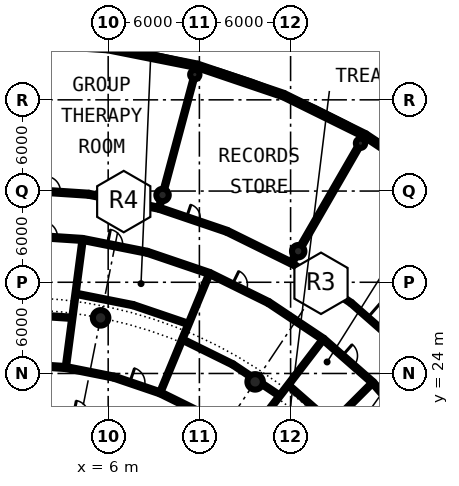
"""IFC4 building model, lengths in metres.
Left out: names, types, materials, properties, quantities, classifications, styles, units other than length and angle.
Written with IfcOpenShell. Run it as: python <this file> out.ifc"""

import sys

from ifc_helpers import new_model, si_unit, direction, frame, frame_2d, origin, origin_2d, place, context, subcontext, project, spatial, rectangle, hollow_circle, extrude, element, fill, save


model = new_model("IFC4")
c1 = context("Model", 3, precision=1e-05, world=origin(), true_north=direction((0.0, 1.0)))
c2 = subcontext(c1, "Body", "Model", "MODEL_VIEW")
j1 = project(units=[si_unit("LENGTHUNIT", "METRE"), si_unit("PLANEANGLEUNIT", "RADIAN")], contexts=[c1])
p1 = place(None, origin())
s1 = spatial("IfcSite", under=j1, at=p1, CompositionType="ELEMENT")
p2 = place(p1, origin())
s2 = spatial("IfcBuilding", under=s1, at=p2, CompositionType="ELEMENT")
p3 = place(p2, frame((0.0, 0.0, 5.4)))
s3 = spatial("IfcBuildingStorey", under=s2, at=p3, CompositionType="ELEMENT", Elevation=5.4)
for number, where, z_axis, x_axis in (
    (1, (15.667, 23.448, 0.0), (0.0, 0.0, 1.0), (1.0, 0.0, 0.0)),
    (2, (5.501, 27.658, 0.0), (0.0, 0.0, 1.0), (1.0, 0.0, 0.0)),
):
    element("IfcColumn", number, at=place(p3, frame(where, z_axis=z_axis, x_axis=x_axis)), inside=s3, PredefinedType="COLUMN", context=c2, shape_type="SweptSolid", body=[
        extrude(hollow_circle(Radius=0.508, WallThickness=0.05, at=origin_2d()), origin(), (0.0, 0.0, 1.0), 4.2),
    ])
for number, where, z_axis, x_axis in (
    (3, (18.5, 32.043, 0.0), (0.0, 0.0, 1.0), (1.0, 0.0, 0.0)),
    (4, (9.576, 35.739, 0.0), (0.0, 0.0, 1.0), (1.0, 0.0, 0.0)),
):
    element("IfcColumn", number, at=place(p3, frame(where, z_axis=z_axis, x_axis=x_axis)), inside=s3, PredefinedType="COLUMN", context=c2, shape_type="SweptSolid", body=[
        extrude(hollow_circle(Radius=0.406, WallThickness=0.03, at=origin_2d()), origin(), (0.0, 0.0, 1.0), 4.2),
    ])
for number, where, z_axis, x_axis in (
    (5, (22.6, 39.144, 0.0), (0.0, 0.0, 1.0), (1.0, 0.0, 0.0)),
    (6, (11.698, 43.66, 0.0), (0.0, 0.0, 1.0), (1.0, 0.0, 0.0)),
):
    element("IfcColumn", number, at=place(p3, frame(where, z_axis=z_axis, x_axis=x_axis)), inside=s3, PredefinedType="COLUMN", context=c2, shape_type="SweptSolid", body=[
        extrude(hollow_circle(Radius=0.305, WallThickness=0.025, at=origin_2d()), origin(), (0.0, 0.0, 1.0), 4.2),
    ])
p4 = place(p3, frame((27.881, 36.336, 0.0), z_axis=(0.0, 0.0, 1.0), x_axis=(-0.831485590074, 0.55554631985, 0.0)))
e7 = element("IfcWall", 7, at=p4, inside=s3, PredefinedType="SOLIDWALL", context=c2, shape_type="SweptSolid", body=[
    extrude(rectangle(XDim=5.991, YDim=0.3, at=frame_2d((2.995, 0.0))), origin(), (0.0, 0.0, 1.0), 3.7),
])
p5 = place(p4, frame((1.495, 0.0, 1.0)))
e8 = element("IfcOpeningElement", 8, at=p5, cuts=e7, PredefinedType="OPENING", context=c2, shape_type="SweptSolid", body=[
    extrude(rectangle(XDim=3.0, YDim=2.0, at=frame_2d((1.5, 1.0))), frame((0.0, 0.16, 0.0), z_axis=(0.0, -1.0, 0.0), x_axis=(1.0, 0.0, 0.0)), (0.0, 0.0, 1.0), 0.32),
])
p6 = place(p3, frame((22.9, 39.664, 0.0), z_axis=(0.0, 0.0, 1.0), x_axis=(-0.896850939151, 0.44233289833, 0.0)))
e9 = element("IfcWall", 9, at=p6, inside=s3, PredefinedType="SOLIDWALL", context=c2, shape_type="SweptSolid", body=[
    extrude(rectangle(XDim=5.991, YDim=0.3, at=frame_2d((2.995, 0.0))), origin(), (0.0, 0.0, 1.0), 3.7),
])
p7 = place(p6, frame((1.495, 0.0, 1.0)))
e10 = element("IfcOpeningElement", 10, at=p7, cuts=e9, PredefinedType="OPENING", context=c2, shape_type="SweptSolid", body=[
    extrude(rectangle(XDim=3.0, YDim=2.0, at=frame_2d((1.5, 1.0))), frame((0.0, 0.16, 0.0), z_axis=(0.0, -1.0, 0.0), x_axis=(1.0, 0.0, 0.0)), (0.0, 0.0, 1.0), 0.32),
])
p8 = place(p3, frame((17.527, 42.314, 0.0), z_axis=(0.0, 0.0, 1.0), x_axis=(-0.946966078776, 0.321333542675, 0.0)))
e11 = element("IfcWall", 11, at=p8, inside=s3, PredefinedType="SOLIDWALL", context=c2, shape_type="SweptSolid", body=[
    extrude(rectangle(XDim=5.991, YDim=0.3, at=frame_2d((2.995, 0.0))), origin(), (0.0, 0.0, 1.0), 3.7),
])
p9 = place(p8, frame((1.495, 0.0, 1.0)))
e12 = element("IfcOpeningElement", 12, at=p9, cuts=e11, PredefinedType="OPENING", context=c2, shape_type="SweptSolid", body=[
    extrude(rectangle(XDim=3.0, YDim=2.0, at=frame_2d((1.5, 1.0))), frame((0.0, 0.16, 0.0), z_axis=(0.0, -1.0, 0.0), x_axis=(1.0, 0.0, 0.0)), (0.0, 0.0, 1.0), 0.32),
])
p10 = place(p3, frame((11.854, 44.239, 0.0), z_axis=(0.0, 0.0, 1.0), x_axis=(-0.980780780021, 0.195112945602, 0.0)))
e13 = element("IfcWall", 13, at=p10, inside=s3, PredefinedType="SOLIDWALL", context=c2, shape_type="SweptSolid", body=[
    extrude(rectangle(XDim=5.991, YDim=0.3, at=frame_2d((2.996, 0.0))), origin(), (0.0, 0.0, 1.0), 3.7),
])
p11 = place(p10, frame((1.495, 0.0, 1.0)))
e14 = element("IfcOpeningElement", 14, at=p11, cuts=e13, PredefinedType="OPENING", context=c2, shape_type="SweptSolid", body=[
    extrude(rectangle(XDim=3.0, YDim=2.0, at=frame_2d((1.5, 1.0))), frame((0.0, 0.16, 0.0), z_axis=(0.0, -1.0, 0.0), x_axis=(1.0, 0.0, 0.0)), (0.0, 0.0, 1.0), 0.32),
])
p12 = place(p3, frame((3.213, 24.39, 0.0), z_axis=(0.0, 0.0, 1.0), x_axis=(0.130265034912, 0.991479208395, 0.0)))
e15 = element("IfcWall", 15, at=p12, inside=s3, PredefinedType="PARTITIONING", context=c2, shape_type="SweptSolid", body=[
    extrude(rectangle(XDim=8.5, YDim=0.15, at=frame_2d((4.25, 0.0))), origin(), (0.0, 0.0, 1.0), 3.7),
])
p13 = place(p3, frame((9.341, 34.87, 0.0), z_axis=(0.0, 0.0, 1.0), x_axis=(0.259239435518, 0.965813084956, 0.0)))
e16 = element("IfcWall", 16, at=p13, inside=s3, PredefinedType="PARTITIONING", context=c2, shape_type="SweptSolid", body=[
    extrude(rectangle(XDim=0.501, YDim=0.15, at=frame_2d((0.25, 0.0))), origin(), (0.0, 0.0, 1.0), 3.7),
])
p14 = place(p3, frame((9.414, 22.727, 0.0), z_axis=(0.0, 0.0, 1.0), x_axis=(0.38259533032, 0.923916020652, 0.0)))
e17 = element("IfcWall", 17, at=p14, inside=s3, PredefinedType="PARTITIONING", context=c2, shape_type="SweptSolid", body=[
    extrude(rectangle(XDim=8.5, YDim=0.15, at=frame_2d((4.25, 0.0))), origin(), (0.0, 0.0, 1.0), 3.7),
])
p15 = place(p3, frame((9.678, 36.126, 0.0), z_axis=(0.0, 0.0, 1.0), x_axis=(0.258647138934, 0.965971872013, 0.0)))
e18 = element("IfcWall", 18, at=p15, inside=s3, PredefinedType="PARTITIONING", context=c2, shape_type="SweptSolid", body=[
    extrude(rectangle(XDim=7.5, YDim=0.15, at=frame_2d((3.75, 0.0))), origin(), (0.0, 0.0, 1.0), 3.7),
])
p16 = place(p3, frame((14.976, 19.516, 0.0), z_axis=(0.0, 0.0, 1.0), x_axis=(0.608691402198, 0.793407068843, 0.0)))
e19 = element("IfcWall", 19, at=p16, inside=s3, PredefinedType="PARTITIONING", context=c2, shape_type="SweptSolid", body=[
    extrude(rectangle(XDim=8.5, YDim=0.15, at=frame_2d((4.25, 0.0))), origin(), (0.0, 0.0, 1.0), 3.7),
])
p17 = place(p3, frame((17.395, 17.395, 0.0), z_axis=(0.0, 0.0, 1.0), x_axis=(0.707106781187, 0.707106781187, 0.0)))
e20 = element("IfcWall", 20, at=p17, inside=s3, PredefinedType="PARTITIONING", context=c2, shape_type="SweptSolid", body=[
    extrude(rectangle(XDim=8.5, YDim=0.15, at=frame_2d((4.25, 0.0))), origin(), (0.0, 0.0, 1.0), 3.7),
])
p18 = place(p3, frame((18.052, 31.263, 0.0), z_axis=(0.0, 0.0, 1.0), x_axis=(0.499919672301, 0.866071776036, 0.0)))
e21 = element("IfcWall", 21, at=p18, inside=s3, PredefinedType="PARTITIONING", context=c2, shape_type="SweptSolid", body=[
    extrude(rectangle(XDim=0.5, YDim=0.2, at=frame_2d((0.25, 0.0))), origin(), (0.0, 0.0, 1.0), 3.7),
])
p19 = place(p3, frame((18.701, 32.388, 0.0), z_axis=(0.0, 0.0, 1.0), x_axis=(0.500101881357, 0.865966574565, 0.0)))
e22 = element("IfcWall", 22, at=p19, inside=s3, PredefinedType="PARTITIONING", context=c2, shape_type="SweptSolid", body=[
    extrude(rectangle(XDim=7.5, YDim=0.2, at=frame_2d((3.75, 0.0))), origin(), (0.0, 0.0, 1.0), 3.7),
])
p20 = place(p3, frame((0.0, 24.6, 0.0), z_axis=(0.0, 0.0, 1.0), x_axis=(0.997864008616, -0.06532549509, 0.0)))
e23 = element("IfcWall", 23, at=p20, inside=s3, PredefinedType="PARTITIONING", context=c2, shape_type="SweptSolid", body=[
    extrude(rectangle(XDim=3.218, YDim=0.2, at=frame_2d((1.609, 0.0))), origin(), (0.0, 0.0, 1.0), 3.7),
])
p21 = place(p20, frame((1.109, 0.0, 0.0)))
e24 = element("IfcOpeningElement", 24, at=p21, cuts=e23, PredefinedType="OPENING", context=c2, shape_type="SweptSolid", body=[
    extrude(rectangle(XDim=1.0, YDim=2.3, at=frame_2d((0.5, 1.15))), frame((0.0, 0.11, 0.0), z_axis=(0.0, -1.0, 0.0), x_axis=(1.0, 0.0, 0.0)), (0.0, 0.0, 1.0), 0.22),
])
p22 = place(p3, frame((3.211, 24.39, 0.0), z_axis=(0.0, 0.0, 1.0), x_axis=(0.98077570041, -0.195138477717, 0.0)))
e25 = element("IfcWall", 25, at=p22, inside=s3, PredefinedType="PARTITIONING", context=c2, shape_type="SweptSolid", body=[
    extrude(rectangle(XDim=3.218, YDim=0.2, at=frame_2d((1.609, 0.0))), origin(), (0.0, 0.0, 1.0), 3.7),
])
p23 = place(p3, frame((6.367, 23.762, 0.0), z_axis=(0.0, 0.0, 1.0), x_axis=(0.946877665823, -0.321593976879, 0.0)))
e26 = element("IfcWall", 26, at=p23, inside=s3, PredefinedType="PARTITIONING", context=c2, shape_type="SweptSolid", body=[
    extrude(rectangle(XDim=3.218, YDim=0.2, at=frame_2d((1.609, 0.0))), origin(), (0.0, 0.0, 1.0), 3.7),
])
p24 = place(p23, frame((1.109, 0.0, 0.0)))
e27 = element("IfcOpeningElement", 27, at=p24, cuts=e26, PredefinedType="OPENING", context=c2, shape_type="SweptSolid", body=[
    extrude(rectangle(XDim=1.0, YDim=2.3, at=frame_2d((0.5, 1.15))), frame((0.0, 0.11, 0.0), z_axis=(0.0, -1.0, 0.0), x_axis=(1.0, 0.0, 0.0)), (0.0, 0.0, 1.0), 0.22),
])
p25 = place(p3, frame((9.414, 22.727, 0.0), z_axis=(0.0, 0.0, 1.0), x_axis=(0.896886949195, -0.442259878763, 0.0)))
e28 = element("IfcWall", 28, at=p25, inside=s3, PredefinedType="PARTITIONING", context=c2, shape_type="SweptSolid", body=[
    extrude(rectangle(XDim=3.218, YDim=0.2, at=frame_2d((1.609, 0.0))), origin(), (0.0, 0.0, 1.0), 3.7),
])
p26 = place(p3, frame((0.0, 27.9, 0.0), z_axis=(0.0, 0.0, 1.0), x_axis=(0.997853582685, -0.065484559421, 0.0)))
e29 = element("IfcWall", 29, at=p26, inside=s3, PredefinedType="PARTITIONING", context=c2, shape_type="SweptSolid", body=[
    extrude(rectangle(XDim=3.65, YDim=0.15, at=frame_2d((1.825, 0.0))), origin(), (0.0, 0.0, 1.0), 3.7),
])
p27 = place(p3, frame((10.868, 26.238, 0.0), z_axis=(0.0, 0.0, 1.0), x_axis=(0.896884439776, -0.442264967738, 0.0)))
e30 = element("IfcWall", 30, at=p27, inside=s3, PredefinedType="PARTITIONING", context=c2, shape_type="SweptSolid", body=[
    extrude(rectangle(XDim=3.715, YDim=0.15, at=frame_2d((1.857, 0.0))), origin(), (0.0, 0.0, 1.0), 3.7),
])
for number, where, z_axis, x_axis in (
    (31, (14.2, 24.595, 0.0), (0.0, 0.0, 1.0), (0.832, -0.555, 0.0)),
    (32, (16.145, 23.295, 0.0), (0.0, 0.0, 1.0), (0.832, -0.555, 0.0)),
):
    element("IfcWall", number, at=place(p3, frame(where, z_axis=z_axis, x_axis=x_axis)), inside=s3, PredefinedType="PARTITIONING", context=c2, shape_type="SweptSolid", body=[
        extrude(rectangle(XDim=1.376, YDim=0.15, at=frame_2d((0.688, 0.0))), origin(), (0.0, 0.0, 1.0), 3.7),
    ])
p28 = place(p3, frame((17.837, 23.245, 0.0), z_axis=(0.0, 0.0, 1.0), x_axis=(0.751782936662, -0.659410658197, 0.0)))
e33 = element("IfcWall", 33, at=p28, inside=s3, PredefinedType="PARTITIONING", context=c2, shape_type="SweptSolid", body=[
    extrude(rectangle(XDim=3.832, YDim=0.15, at=frame_2d((1.916, 0.0))), origin(), (0.0, 0.0, 1.0), 3.7),
])
p29 = place(p3, frame((3.851, 29.248, 0.0), z_axis=(0.0, 0.0, 1.0), x_axis=(0.980772477442, -0.195154675813, 0.0)))
e34 = element("IfcWall", 34, at=p29, inside=s3, PredefinedType="PARTITIONING", context=c2, shape_type="SweptSolid", body=[
    extrude(rectangle(XDim=3.858, YDim=0.15, at=frame_2d((1.929, 0.0))), origin(), (0.0, 0.0, 1.0), 3.7),
])
p30 = place(p3, frame((7.635, 28.495, 0.0), z_axis=(0.0, 0.0, 1.0), x_axis=(0.946864867945, -0.321631655551, 0.0)))
e35 = element("IfcWall", 35, at=p30, inside=s3, PredefinedType="PARTITIONING", context=c2, shape_type="SweptSolid", body=[
    extrude(rectangle(XDim=3.859, YDim=0.15, at=frame_2d((1.93, 0.0))), origin(), (0.0, 0.0, 1.0), 3.7),
])
p31 = place(p3, frame((0.0, 33.1, 0.0), z_axis=(0.0, 0.0, 1.0), x_axis=(0.997858156097, -0.065414832499, 0.0)))
e36 = element("IfcWall", 36, at=p31, inside=s3, PredefinedType="PARTITIONING", context=c2, shape_type="SweptSolid", body=[
    extrude(rectangle(XDim=4.329, YDim=0.2, at=frame_2d((2.165, 0.0))), origin(), (0.0, 0.0, 1.0), 3.7),
])
p32 = place(p31, frame((1.665, 0.0, 0.0)))
e37 = element("IfcOpeningElement", 37, at=p32, cuts=e36, PredefinedType="OPENING", context=c2, shape_type="SweptSolid", body=[
    extrude(rectangle(XDim=1.0, YDim=2.3, at=frame_2d((0.5, 1.15))), frame((0.0, 0.11, 0.0), z_axis=(0.0, -1.0, 0.0), x_axis=(1.0, 0.0, 0.0)), (0.0, 0.0, 1.0), 0.22),
])
p33 = place(p3, frame((4.32, 32.817, 0.0), z_axis=(0.0, 0.0, 1.0), x_axis=(0.980775360662, -0.195140185298, 0.0)))
e38 = element("IfcWall", 38, at=p33, inside=s3, PredefinedType="PARTITIONING", context=c2, shape_type="SweptSolid", body=[
    extrude(rectangle(XDim=4.33, YDim=0.2, at=frame_2d((2.165, 0.0))), origin(), (0.0, 0.0, 1.0), 3.7),
])
p34 = place(p33, frame((1.665, 0.0, 0.0)))
e39 = element("IfcOpeningElement", 39, at=p34, cuts=e38, PredefinedType="OPENING", context=c2, shape_type="SweptSolid", body=[
    extrude(rectangle(XDim=1.0, YDim=2.3, at=frame_2d((0.5, 1.15))), frame((0.0, 0.11, 0.0), z_axis=(0.0, -1.0, 0.0), x_axis=(1.0, 0.0, 0.0)), (0.0, 0.0, 1.0), 0.22),
])
p35 = place(p3, frame((8.567, 31.972, 0.0), z_axis=(0.0, 0.0, 1.0), x_axis=(0.946926608104, -0.3214498388, 0.0)))
e40 = element("IfcWall", 40, at=p35, inside=s3, PredefinedType="PARTITIONING", context=c2, shape_type="SweptSolid", body=[
    extrude(rectangle(XDim=4.33, YDim=0.2, at=frame_2d((2.165, 0.0))), origin(), (0.0, 0.0, 1.0), 3.7),
])
p36 = place(p3, frame((12.667, 30.58, 0.0), z_axis=(0.0, 0.0, 1.0), x_axis=(0.89686106512, -0.442312366853, 0.0)))
e41 = element("IfcWall", 41, at=p36, inside=s3, PredefinedType="PARTITIONING", context=c2, shape_type="SweptSolid", body=[
    extrude(rectangle(XDim=4.33, YDim=0.2, at=frame_2d((2.165, 0.0))), origin(), (0.0, 0.0, 1.0), 3.7),
])
p37 = place(p36, frame((1.665, 0.0, 0.0)))
e42 = element("IfcOpeningElement", 42, at=p37, cuts=e41, PredefinedType="OPENING", context=c2, shape_type="SweptSolid", body=[
    extrude(rectangle(XDim=1.0, YDim=2.3, at=frame_2d((0.5, 1.15))), frame((0.0, 0.11, 0.0), z_axis=(0.0, -1.0, 0.0), x_axis=(1.0, 0.0, 0.0)), (0.0, 0.0, 1.0), 0.22),
])
p38 = place(p3, frame((16.55, 28.665, 0.0), z_axis=(0.0, 0.0, 1.0), x_axis=(0.831503319646, -0.555519783102, 0.0)))
e43 = element("IfcWall", 43, at=p38, inside=s3, PredefinedType="PARTITIONING", context=c2, shape_type="SweptSolid", body=[
    extrude(rectangle(XDim=4.329, YDim=0.2, at=frame_2d((2.165, 0.0))), origin(), (0.0, 0.0, 1.0), 3.7),
])
p39 = place(p3, frame((20.15, 26.26, 0.0), z_axis=(0.0, 0.0, 1.0), x_axis=(0.75180422834, -0.659386383125, 0.0)))
e44 = element("IfcWall", 44, at=p39, inside=s3, PredefinedType="PARTITIONING", context=c2, shape_type="SweptSolid", body=[
    extrude(rectangle(XDim=4.33, YDim=0.2, at=frame_2d((2.165, 0.0))), origin(), (0.0, 0.0, 1.0), 3.7),
])
p40 = place(p39, frame((1.665, 0.0, 0.0)))
e45 = element("IfcOpeningElement", 45, at=p40, cuts=e44, PredefinedType="OPENING", context=c2, shape_type="SweptSolid", body=[
    extrude(rectangle(XDim=1.0, YDim=2.3, at=frame_2d((0.5, 1.15))), frame((0.0, 0.11, 0.0), z_axis=(0.0, -1.0, 0.0), x_axis=(1.0, 0.0, 0.0)), (0.0, 0.0, 1.0), 0.22),
])
p41 = place(p3, frame((23.405, 23.405, 0.0), z_axis=(0.0, 0.0, 1.0), x_axis=(0.659386383125, -0.75180422834, 0.0)))
e46 = element("IfcWall", 46, at=p41, inside=s3, PredefinedType="PARTITIONING", context=c2, shape_type="SweptSolid", body=[
    extrude(rectangle(XDim=4.33, YDim=0.2, at=frame_2d((2.165, 0.0))), origin(), (0.0, 0.0, 1.0), 3.7),
])
p42 = place(p41, frame((1.665, 0.0, 0.0)))
e47 = element("IfcOpeningElement", 47, at=p42, cuts=e46, PredefinedType="OPENING", context=c2, shape_type="SweptSolid", body=[
    extrude(rectangle(XDim=1.0, YDim=2.3, at=frame_2d((0.5, 1.15))), frame((0.0, 0.11, 0.0), z_axis=(0.0, -1.0, 0.0), x_axis=(1.0, 0.0, 0.0)), (0.0, 0.0, 1.0), 0.22),
])
p43 = place(p3, frame((0.0, 36.1, 0.0), z_axis=(0.0, 0.0, 1.0), x_axis=(0.997855509942, -0.065455185264, 0.0)))
e48 = element("IfcWall", 48, at=p43, inside=s3, PredefinedType="PARTITIONING", context=c2, shape_type="SweptSolid", body=[
    extrude(rectangle(XDim=4.722, YDim=0.2, at=frame_2d((2.361, 0.0))), origin(), (0.0, 0.0, 1.0), 3.7),
])
p44 = place(p43, frame((1.861, 0.0, 0.0)))
e49 = element("IfcOpeningElement", 49, at=p44, cuts=e48, PredefinedType="OPENING", context=c2, shape_type="SweptSolid", body=[
    extrude(rectangle(XDim=1.0, YDim=2.3, at=frame_2d((0.5, 1.15))), frame((0.0, 0.11, 0.0), z_axis=(0.0, -1.0, 0.0), x_axis=(1.0, 0.0, 0.0)), (0.0, 0.0, 1.0), 0.22),
])
p45 = place(p3, frame((4.712, 35.791, 0.0), z_axis=(0.0, 0.0, 1.0), x_axis=(0.980796841032, -0.195032193809, 0.0)))
e50 = element("IfcWall", 50, at=p45, inside=s3, PredefinedType="PARTITIONING", context=c2, shape_type="SweptSolid", body=[
    extrude(rectangle(XDim=4.722, YDim=0.2, at=frame_2d((2.361, 0.0))), origin(), (0.0, 0.0, 1.0), 3.7),
])
p46 = place(p3, frame((9.343, 34.87, 0.0), z_axis=(0.0, 0.0, 1.0), x_axis=(0.946926725229, -0.321449493775, 0.0)))
e51 = element("IfcWall", 51, at=p46, inside=s3, PredefinedType="PARTITIONING", context=c2, shape_type="SweptSolid", body=[
    extrude(rectangle(XDim=4.723, YDim=0.2, at=frame_2d((2.361, 0.0))), origin(), (0.0, 0.0, 1.0), 3.7),
])
p47 = place(p46, frame((1.911, 0.0, 0.0)))
e52 = element("IfcOpeningElement", 52, at=p47, cuts=e51, PredefinedType="OPENING", context=c2, shape_type="SweptSolid", body=[
    extrude(rectangle(XDim=0.9, YDim=2.3, at=frame_2d((0.45, 1.15))), frame((0.0, 0.11, 0.0), z_axis=(0.0, -1.0, 0.0), x_axis=(1.0, 0.0, 0.0)), (0.0, 0.0, 1.0), 0.22),
])
p48 = place(p3, frame((13.815, 33.352, 0.0), z_axis=(0.0, 0.0, 1.0), x_axis=(0.896905425474, -0.442222407568, 0.0)))
e53 = element("IfcWall", 53, at=p48, inside=s3, PredefinedType="PARTITIONING", context=c2, shape_type="SweptSolid", body=[
    extrude(rectangle(XDim=4.722, YDim=0.2, at=frame_2d((2.361, 0.0))), origin(), (0.0, 0.0, 1.0), 3.7),
])
p49 = place(p3, frame((18.05, 31.264, 0.0), z_axis=(0.0, 0.0, 1.0), x_axis=(0.831397496099, -0.555678147384, 0.0)))
e54 = element("IfcWall", 54, at=p49, inside=s3, PredefinedType="PARTITIONING", context=c2, shape_type="SweptSolid", body=[
    extrude(rectangle(XDim=4.722, YDim=0.15, at=frame_2d((2.361, 0.0))), origin(), (0.0, 0.0, 1.0), 3.7),
])
p50 = place(p3, frame((21.976, 28.64, 0.0), z_axis=(0.0, 0.0, 1.0), x_axis=(0.751983893099, -0.659181480716, 0.0)))
e55 = element("IfcWall", 55, at=p50, inside=s3, PredefinedType="PARTITIONING", context=c2, shape_type="SweptSolid", body=[
    extrude(rectangle(XDim=4.722, YDim=0.15, at=frame_2d((2.361, 0.0))), origin(), (0.0, 0.0, 1.0), 3.7),
])
p51 = place(p50, frame((1.461, 0.0, 0.0)))
e56 = element("IfcOpeningElement", 56, at=p51, cuts=e55, PredefinedType="OPENING", context=c2, shape_type="SweptSolid", body=[
    extrude(rectangle(XDim=1.8, YDim=2.3, at=frame_2d((0.9, 1.15))), frame((0.0, 0.085, 0.0), z_axis=(0.0, -1.0, 0.0), x_axis=(1.0, 0.0, 0.0)), (0.0, 0.0, 1.0), 0.17),
])
p52 = place(p7, origin())
e57 = element("IfcWindow", 57, at=p52, inside=s3, PartitioningType="SINGLE_PANEL", PredefinedType="WINDOW", context=c2, shape_type="SweptSolid", body=[
    extrude(rectangle(XDim=3.0, YDim=2.0, at=frame_2d((1.5, 1.0))), frame((0.0, 0.03, 0.0), z_axis=(0.0, -1.0, 0.0), x_axis=(1.0, 0.0, 0.0)), (0.0, 0.0, 1.0), 0.06),
])
fill(e10, e57)
p53 = place(p9, origin())
e58 = element("IfcWindow", 58, at=p53, inside=s3, PartitioningType="SINGLE_PANEL", PredefinedType="WINDOW", context=c2, shape_type="SweptSolid", body=[
    extrude(rectangle(XDim=3.0, YDim=2.0, at=frame_2d((1.5, 1.0))), frame((0.0, 0.03, 0.0), z_axis=(0.0, -1.0, 0.0), x_axis=(1.0, 0.0, 0.0)), (0.0, 0.0, 1.0), 0.06),
])
fill(e12, e58)
p54 = place(p11, origin())
e59 = element("IfcWindow", 59, at=p54, inside=s3, PartitioningType="SINGLE_PANEL", PredefinedType="WINDOW", context=c2, shape_type="SweptSolid", body=[
    extrude(rectangle(XDim=3.0, YDim=2.0, at=frame_2d((1.5, 1.0))), frame((0.0, 0.03, 0.0), z_axis=(0.0, -1.0, 0.0), x_axis=(1.0, 0.0, 0.0)), (0.0, 0.0, 1.0), 0.06),
])
fill(e14, e59)
p55 = place(p40, origin())
e60 = element("IfcDoor", 60, at=p55, inside=s3, OperationType="SINGLE_SWING_LEFT", PredefinedType="DOOR", context=c2, shape_type="SweptSolid", body=[
    extrude(rectangle(XDim=1.0, YDim=2.3, at=frame_2d((0.5, 1.15))), frame((0.0, 0.025, 0.0), z_axis=(0.0, -1.0, 0.0), x_axis=(1.0, 0.0, 0.0)), (0.0, 0.0, 1.0), 0.05),
])
fill(e45, e60)
p56 = place(p37, origin())
e61 = element("IfcDoor", 61, at=p56, inside=s3, OperationType="SINGLE_SWING_RIGHT", PredefinedType="DOOR", context=c2, shape_type="SweptSolid", body=[
    extrude(rectangle(XDim=1.0, YDim=2.3, at=frame_2d((0.5, 1.15))), frame((0.0, 0.025, 0.0), z_axis=(0.0, -1.0, 0.0), x_axis=(1.0, 0.0, 0.0)), (0.0, 0.0, 1.0), 0.05),
])
fill(e42, e61)
p57 = place(p24, origin())
e62 = element("IfcDoor", 62, at=p57, inside=s3, OperationType="SINGLE_SWING_RIGHT", PredefinedType="DOOR", context=c2, shape_type="SweptSolid", body=[
    extrude(rectangle(XDim=1.0, YDim=2.3, at=frame_2d((0.5, 1.15))), frame((0.0, 0.025, 0.0), z_axis=(0.0, -1.0, 0.0), x_axis=(1.0, 0.0, 0.0)), (0.0, 0.0, 1.0), 0.05),
])
fill(e27, e62)
p58 = place(p34, origin())
e63 = element("IfcDoor", 63, at=p58, inside=s3, OperationType="SINGLE_SWING_LEFT", PredefinedType="DOOR", context=c2, shape_type="SweptSolid", body=[
    extrude(rectangle(XDim=1.0, YDim=2.3, at=frame_2d((0.5, 1.15))), frame((0.0, 0.025, 0.0), z_axis=(0.0, -1.0, 0.0), x_axis=(1.0, 0.0, 0.0)), (0.0, 0.0, 1.0), 0.05),
])
fill(e39, e63)
p59 = place(p32, origin())
e64 = element("IfcDoor", 64, at=p59, inside=s3, OperationType="SINGLE_SWING_RIGHT", PredefinedType="DOOR", context=c2, shape_type="SweptSolid", body=[
    extrude(rectangle(XDim=1.0, YDim=2.3, at=frame_2d((0.5, 1.15))), frame((0.0, 0.025, 0.0), z_axis=(0.0, -1.0, 0.0), x_axis=(1.0, 0.0, 0.0)), (0.0, 0.0, 1.0), 0.05),
])
fill(e37, e64)
p60 = place(p51, origin())
e65 = element("IfcDoor", 65, at=p60, inside=s3, OperationType="DOUBLE_DOOR_SINGLE_SWING", PredefinedType="DOOR", context=c2, shape_type="SweptSolid", body=[
    extrude(rectangle(XDim=1.8, YDim=2.3, at=frame_2d((0.9, 1.15))), frame((0.0, 0.025, 0.0), z_axis=(0.0, -1.0, 0.0), x_axis=(1.0, 0.0, 0.0)), (0.0, 0.0, 1.0), 0.05),
])
fill(e56, e65)
p61 = place(p47, origin())
e66 = element("IfcDoor", 66, at=p61, inside=s3, OperationType="SINGLE_SWING_RIGHT", PredefinedType="DOOR", context=c2, shape_type="SweptSolid", body=[
    extrude(rectangle(XDim=0.9, YDim=2.3, at=frame_2d((0.45, 1.15))), frame((0.0, 0.025, 0.0), z_axis=(0.0, -1.0, 0.0), x_axis=(1.0, 0.0, 0.0)), (0.0, 0.0, 1.0), 0.05),
])
fill(e52, e66)
p62 = place(p44, origin())
e67 = element("IfcDoor", 67, at=p62, inside=s3, OperationType="SINGLE_SWING_RIGHT", PredefinedType="DOOR", context=c2, shape_type="SweptSolid", body=[
    extrude(rectangle(XDim=1.0, YDim=2.3, at=frame_2d((0.5, 1.15))), frame((0.0, 0.025, 0.0), z_axis=(0.0, -1.0, 0.0), x_axis=(1.0, 0.0, 0.0)), (0.0, 0.0, 1.0), 0.05),
])
fill(e49, e67)
save(model, sys.argv[1])
